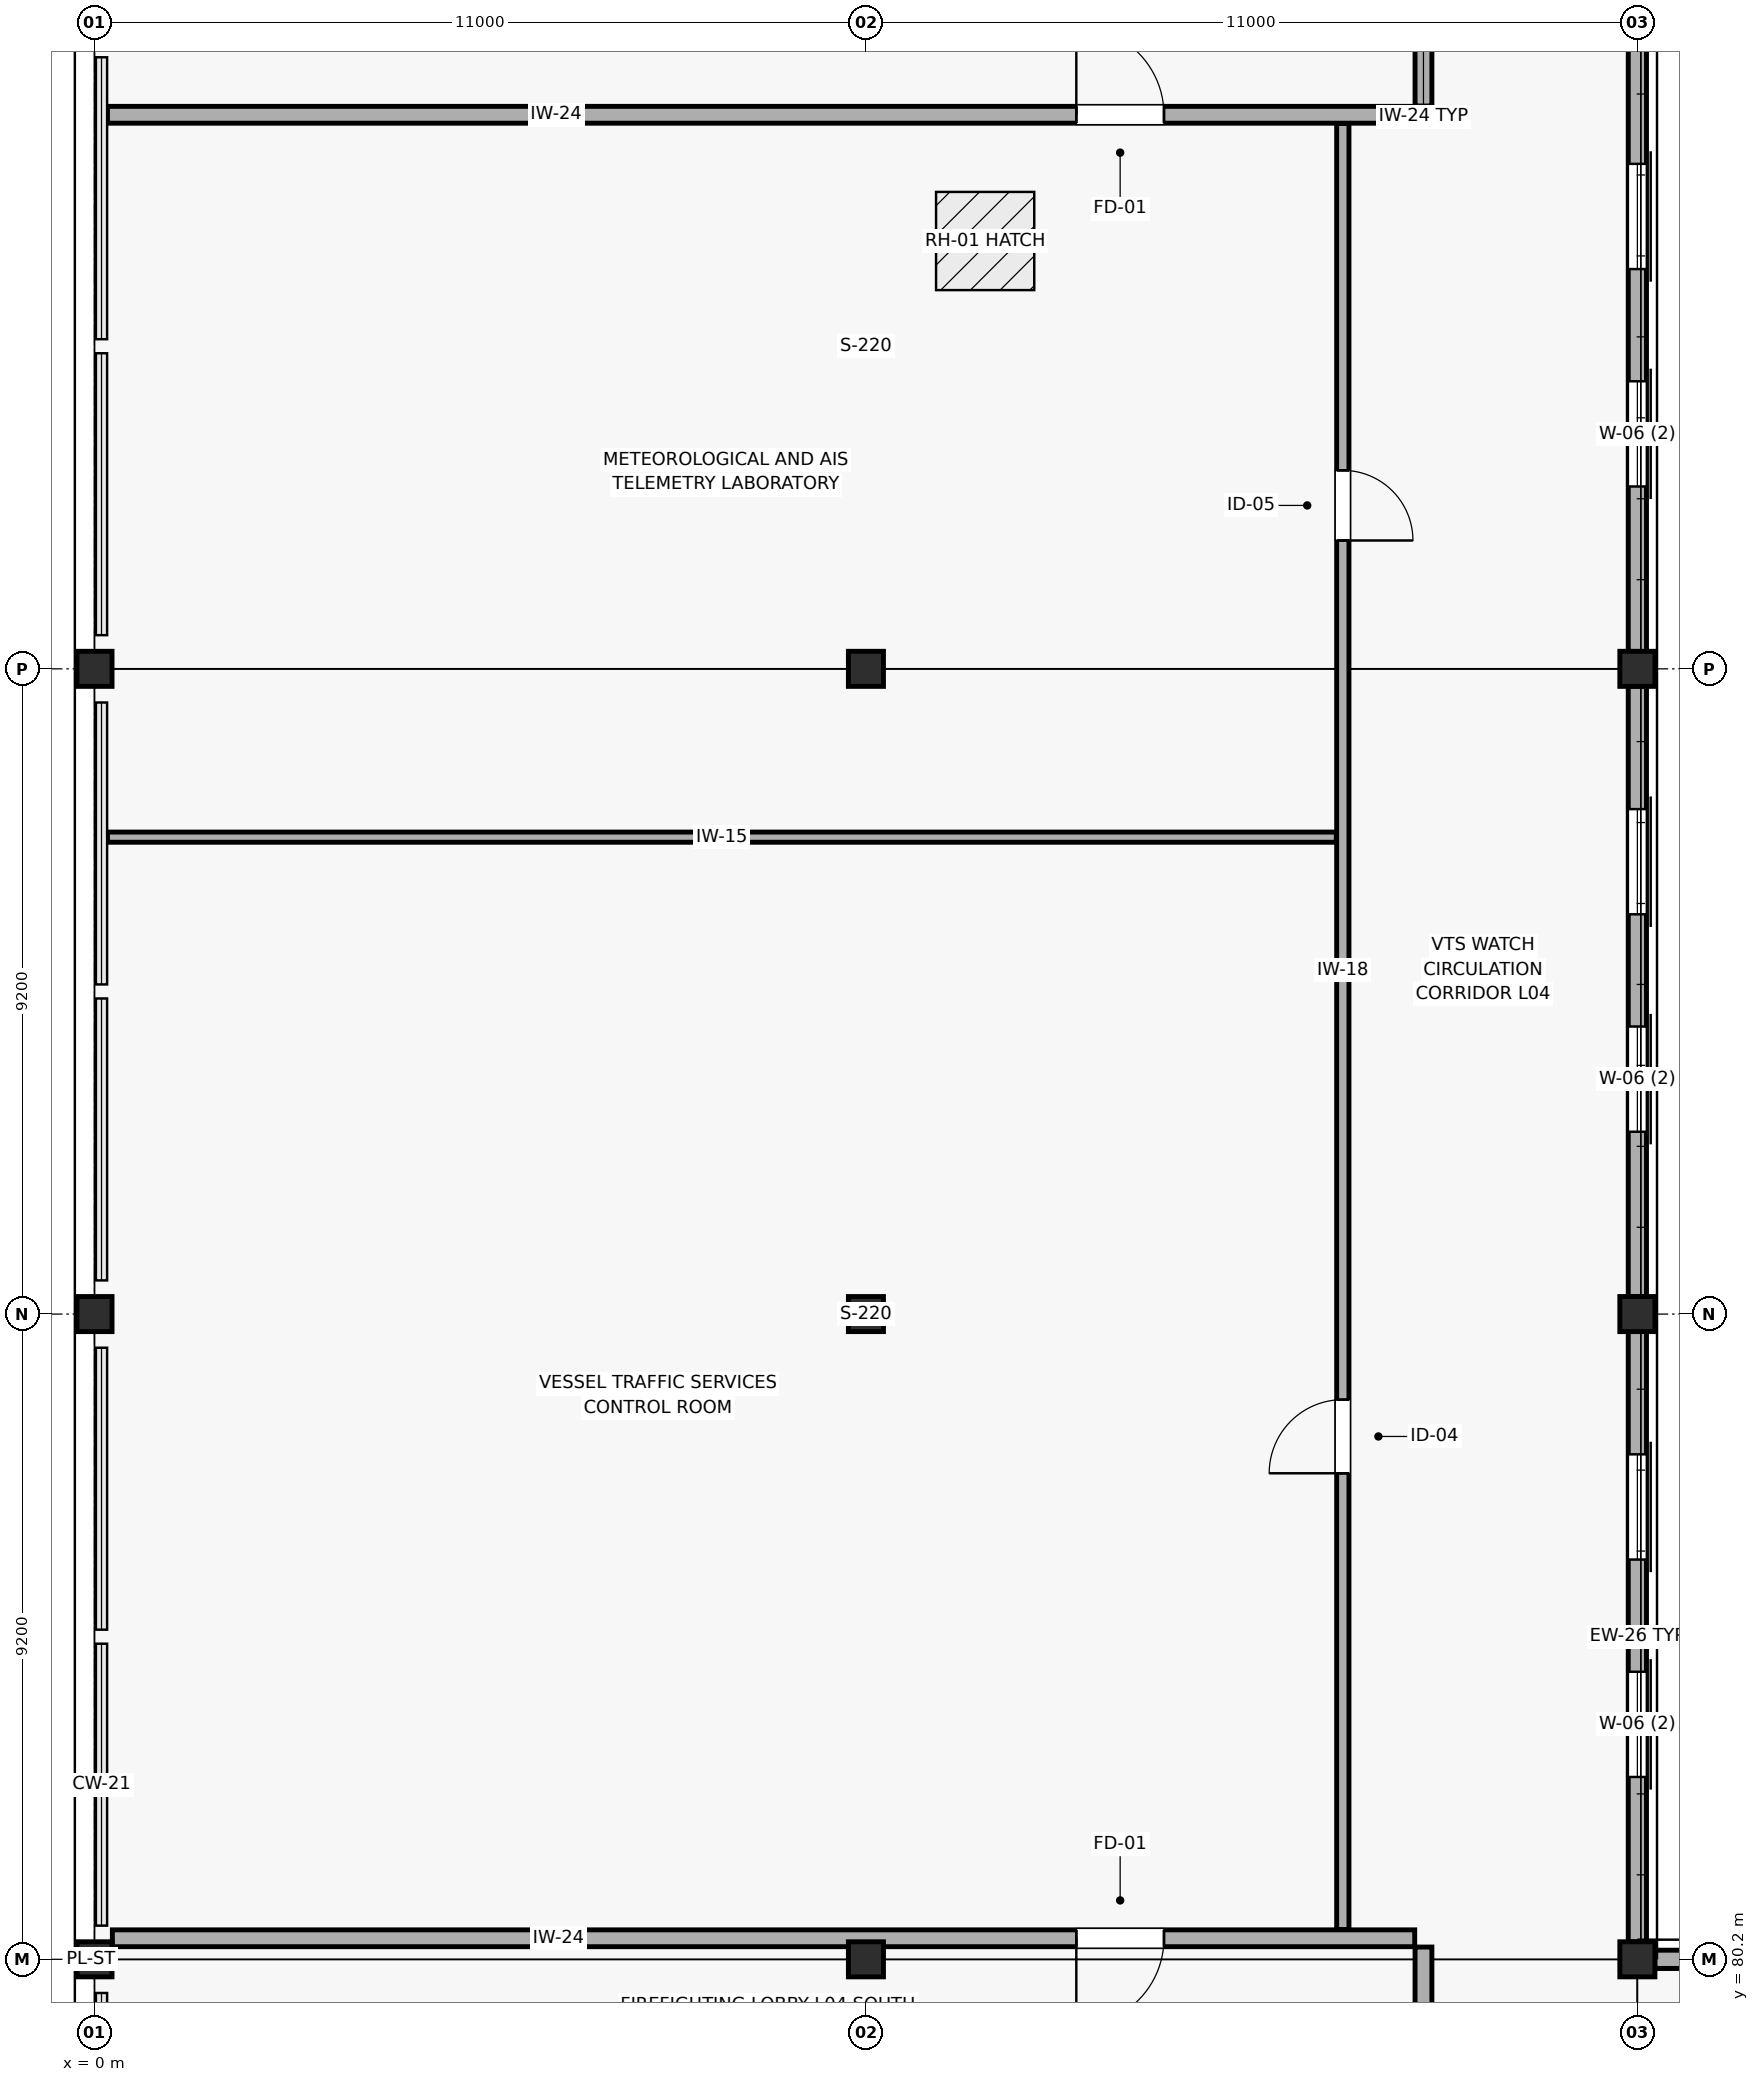
"""IFC4 building model, lengths in metres.
Left out: names, types, materials, properties, quantities, classifications, styles, units other than length and angle.
Written with IfcOpenShell. Run it as: python <this file> out.ifc"""

import sys

from ifc_helpers import new_model, si_unit, direction, frame, frame_2d, origin, origin_2d, place, context, subcontext, project, spatial, rectangle, extrude, element, fill, save


model = new_model("IFC4")
c1 = context("Model", 3, precision=1e-05, world=origin(), true_north=direction((0.0, 1.0)))
c2 = subcontext(c1, "Body", "Model", "MODEL_VIEW")
j1 = project(units=[si_unit("LENGTHUNIT", "METRE"), si_unit("PLANEANGLEUNIT", "RADIAN")], contexts=[c1])
p1 = place(None, origin())
s1 = spatial("IfcSite", under=j1, at=p1, CompositionType="ELEMENT")
p2 = place(p1, origin())
s2 = spatial("IfcBuilding", under=s1, at=p2, CompositionType="ELEMENT")
p3 = place(p2, frame((0.0, 0.0, 18.3)))
s3 = spatial("IfcBuildingStorey", under=s2, at=p3, CompositionType="ELEMENT", Elevation=18.3)
for number, where, z_axis, x_axis in (
    (1, (0.0, 80.2, 0.0), (0.0, 0.0, 1.0), (1.0, 0.0, 0.0)),
    (2, (0.0, 89.4, 0.0), (0.0, 0.0, 1.0), (1.0, 0.0, 0.0)),
    (3, (0.0, 98.6, 0.0), (0.0, 0.0, 1.0), (1.0, 0.0, 0.0)),
    (4, (11.0, 80.2, 0.0), (0.0, 0.0, 1.0), (1.0, 0.0, 0.0)),
    (5, (11.0, 89.4, 0.0), (0.0, 0.0, 1.0), (1.0, 0.0, 0.0)),
    (6, (11.0, 98.6, 0.0), (0.0, 0.0, 1.0), (1.0, 0.0, 0.0)),
    (7, (22.0, 80.2, 0.0), (0.0, 0.0, 1.0), (1.0, 0.0, 0.0)),
    (8, (22.0, 89.4, 0.0), (0.0, 0.0, 1.0), (1.0, 0.0, 0.0)),
    (9, (22.0, 98.6, 0.0), (0.0, 0.0, 1.0), (1.0, 0.0, 0.0)),
):
    element("IfcColumn", number, at=place(p3, frame(where, z_axis=z_axis, x_axis=x_axis)), inside=s3, PredefinedType="COLUMN", context=c2, shape_type="SweptSolid", body=[
        extrude(rectangle(XDim=0.5, YDim=0.5, at=origin_2d()), origin(), (0.0, 0.0, 1.0), 4.2),
    ])
p4 = place(p3, frame((43.752, 80.2, 0.0), z_axis=(0.0, 0.0, 1.0), x_axis=(-1.0, 0.0, 0.0)))
e10 = element("IfcWall", 10, at=p4, inside=s3, PredefinedType="SOLIDWALL", context=c2, shape_type="SweptSolid", body=[
    extrude(rectangle(XDim=21.504, YDim=0.26, at=frame_2d((10.752, 0.0))), origin(), (0.0, 0.0, 1.0), 3.447),
])
p5 = place(p4, frame((4.752, 0.0, 0.95)))
e11 = element("IfcOpeningElement", 11, at=p5, cuts=e10, PredefinedType="OPENING", context=c2, shape_type="SweptSolid", body=[
    extrude(rectangle(XDim=1.8, YDim=1.8, at=frame_2d((0.9, 0.9))), frame((0.0, 0.14, 0.0), z_axis=(0.0, -1.0, 0.0), x_axis=(1.0, 0.0, 0.0)), (0.0, 0.0, 1.0), 0.28),
])
p6 = place(p4, frame((13.252, 0.0, 0.95)))
e12 = element("IfcOpeningElement", 12, at=p6, cuts=e10, PredefinedType="OPENING", context=c2, shape_type="SweptSolid", body=[
    extrude(rectangle(XDim=1.8, YDim=1.8, at=frame_2d((0.9, 0.9))), frame((0.0, 0.14, 0.0), z_axis=(0.0, -1.0, 0.0), x_axis=(1.0, 0.0, 0.0)), (0.0, 0.0, 1.0), 0.28),
])
p7 = place(p3, frame((22.0, 80.448, 0.0), z_axis=(0.0, 0.0, 1.0), x_axis=(0.0, 1.0, 0.0)))
e13 = element("IfcWall", 13, at=p7, inside=s3, PredefinedType="SOLIDWALL", context=c2, shape_type="SweptSolid", body=[
    extrude(rectangle(XDim=8.704, YDim=0.26, at=frame_2d((4.352, 0.0))), origin(), (0.0, 0.0, 1.0), 3.449),
])
p8 = place(p7, frame((2.352, 0.0, 0.95)))
e14 = element("IfcOpeningElement", 14, at=p8, cuts=e13, PredefinedType="OPENING", context=c2, shape_type="SweptSolid", body=[
    extrude(rectangle(XDim=1.5, YDim=1.8, at=frame_2d((0.75, 0.9))), frame((0.0, 0.14, 0.0), z_axis=(0.0, -1.0, 0.0), x_axis=(1.0, 0.0, 0.0)), (0.0, 0.0, 1.0), 0.28),
])
p9 = place(p7, frame((5.452, 0.0, 0.95)))
e15 = element("IfcOpeningElement", 15, at=p9, cuts=e13, PredefinedType="OPENING", context=c2, shape_type="SweptSolid", body=[
    extrude(rectangle(XDim=1.5, YDim=1.8, at=frame_2d((0.75, 0.9))), frame((0.0, 0.14, 0.0), z_axis=(0.0, -1.0, 0.0), x_axis=(1.0, 0.0, 0.0)), (0.0, 0.0, 1.0), 0.28),
])
p10 = place(p3, frame((22.0, 89.648, 0.0), z_axis=(0.0, 0.0, 1.0), x_axis=(0.0, 1.0, 0.0)))
e16 = element("IfcWall", 16, at=p10, inside=s3, PredefinedType="SOLIDWALL", context=c2, shape_type="SweptSolid", body=[
    extrude(rectangle(XDim=8.704, YDim=0.26, at=frame_2d((4.352, 0.0))), origin(), (0.0, 0.0, 1.0), 3.449),
])
p11 = place(p10, frame((2.352, 0.0, 0.95)))
e17 = element("IfcOpeningElement", 17, at=p11, cuts=e16, PredefinedType="OPENING", context=c2, shape_type="SweptSolid", body=[
    extrude(rectangle(XDim=1.5, YDim=1.8, at=frame_2d((0.75, 0.9))), frame((0.0, 0.14, 0.0), z_axis=(0.0, -1.0, 0.0), x_axis=(1.0, 0.0, 0.0)), (0.0, 0.0, 1.0), 0.28),
])
p12 = place(p10, frame((5.452, 0.0, 0.95)))
e18 = element("IfcOpeningElement", 18, at=p12, cuts=e16, PredefinedType="OPENING", context=c2, shape_type="SweptSolid", body=[
    extrude(rectangle(XDim=1.5, YDim=1.8, at=frame_2d((0.75, 0.9))), frame((0.0, 0.14, 0.0), z_axis=(0.0, -1.0, 0.0), x_axis=(1.0, 0.0, 0.0)), (0.0, 0.0, 1.0), 0.28),
])
p13 = place(p3, frame((22.0, 98.848, 0.0), z_axis=(0.0, 0.0, 1.0), x_axis=(0.0, 1.0, 0.0)))
e19 = element("IfcWall", 19, at=p13, inside=s3, PredefinedType="SOLIDWALL", context=c2, shape_type="SweptSolid", body=[
    extrude(rectangle(XDim=8.704, YDim=0.26, at=frame_2d((4.352, 0.0))), origin(), (0.0, 0.0, 1.0), 3.449),
])
p14 = place(p13, frame((2.352, 0.0, 0.95)))
e20 = element("IfcOpeningElement", 20, at=p14, cuts=e19, PredefinedType="OPENING", context=c2, shape_type="SweptSolid", body=[
    extrude(rectangle(XDim=1.5, YDim=1.8, at=frame_2d((0.75, 0.9))), frame((0.0, 0.14, 0.0), z_axis=(0.0, -1.0, 0.0), x_axis=(1.0, 0.0, 0.0)), (0.0, 0.0, 1.0), 0.28),
])
p15 = place(p13, frame((5.452, 0.0, 0.95)))
e21 = element("IfcOpeningElement", 21, at=p15, cuts=e19, PredefinedType="OPENING", context=c2, shape_type="SweptSolid", body=[
    extrude(rectangle(XDim=1.5, YDim=1.8, at=frame_2d((0.75, 0.9))), frame((0.0, 0.14, 0.0), z_axis=(0.0, -1.0, 0.0), x_axis=(1.0, 0.0, 0.0)), (0.0, 0.0, 1.0), 0.28),
])
p16 = place(p3, frame((0.185, 106.5, 0.0), z_axis=(0.0, 0.0, 1.0), x_axis=(1.0, 0.0, 0.0)))
e22 = element("IfcWall", 22, at=p16, inside=s3, PredefinedType="PARTITIONING", context=c2, shape_type="SweptSolid", body=[
    extrude(rectangle(XDim=18.64, YDim=0.24, at=frame_2d((9.32, 0.0))), origin(), (0.0, 0.0, 1.0), 3.449),
])
p17 = place(p16, frame((13.815, 0.0, 0.0)))
e23 = element("IfcOpeningElement", 23, at=p17, cuts=e22, PredefinedType="OPENING", context=c2, shape_type="SweptSolid", body=[
    extrude(rectangle(XDim=1.25, YDim=2.2, at=frame_2d((0.625, 1.1))), frame((0.0, 0.13, 0.0), z_axis=(0.0, -1.0, 0.0), x_axis=(1.0, 0.0, 0.0)), (0.0, 0.0, 1.0), 0.26),
])
p18 = place(p3, frame((0.255, 80.5, 0.0), z_axis=(0.0, 0.0, 1.0), x_axis=(1.0, 0.0, 0.0)))
e24 = element("IfcWall", 24, at=p18, inside=s3, PredefinedType="PARTITIONING", context=c2, shape_type="SweptSolid", body=[
    extrude(rectangle(XDim=18.57, YDim=0.24, at=frame_2d((9.285, 0.0))), origin(), (0.0, 0.0, 1.0), 3.449),
])
p19 = place(p18, frame((13.745, 0.0, 0.0)))
e25 = element("IfcOpeningElement", 25, at=p19, cuts=e24, PredefinedType="OPENING", context=c2, shape_type="SweptSolid", body=[
    extrude(rectangle(XDim=1.25, YDim=2.2, at=frame_2d((0.625, 1.1))), frame((0.0, 0.13, 0.0), z_axis=(0.0, -1.0, 0.0), x_axis=(1.0, 0.0, 0.0)), (0.0, 0.0, 1.0), 0.26),
])
p20 = place(p3, frame((17.8, 80.625, 0.0), z_axis=(0.0, 0.0, 1.0), x_axis=(0.0, 1.0, 0.0)))
e26 = element("IfcWall", 26, at=p20, inside=s3, PredefinedType="PARTITIONING", context=c2, shape_type="SweptSolid", body=[
    extrude(rectangle(XDim=25.75, YDim=0.175, at=frame_2d((12.875, 0.0))), origin(), (0.0, 0.0, 1.0), 3.447),
])
p21 = place(p20, frame((6.505, 0.0, 0.0)))
e27 = element("IfcOpeningElement", 27, at=p21, cuts=e26, PredefinedType="OPENING", context=c2, shape_type="SweptSolid", body=[
    extrude(rectangle(XDim=1.05, YDim=2.2, at=frame_2d((0.525, 1.1))), frame((0.0, 0.097, 0.0), z_axis=(0.0, -1.0, 0.0), x_axis=(1.0, 0.0, 0.0)), (0.0, 0.0, 1.0), 0.195),
])
p22 = place(p20, frame((19.805, 0.0, 0.0)))
e28 = element("IfcOpeningElement", 28, at=p22, cuts=e26, PredefinedType="OPENING", context=c2, shape_type="SweptSolid", body=[
    extrude(rectangle(XDim=1.0, YDim=2.15, at=frame_2d((0.5, 1.075))), frame((0.0, 0.097, 0.0), z_axis=(0.0, -1.0, 0.0), x_axis=(1.0, 0.0, 0.0)), (0.0, 0.0, 1.0), 0.195),
])
p23 = place(p3, frame((0.185, 96.2, 0.0), z_axis=(0.0, 0.0, 1.0), x_axis=(1.0, 0.0, 0.0)))
e29 = element("IfcWall", 29, at=p23, inside=s3, PredefinedType="PARTITIONING", context=c2, shape_type="SweptSolid", body=[
    extrude(rectangle(XDim=17.522, YDim=0.145, at=frame_2d((8.761, 0.0))), origin(), (0.0, 0.0, 1.0), 3.449),
])
p24 = place(p3, frame((18.95, 106.625, 0.0), z_axis=(0.0, 0.0, 1.0), x_axis=(0.0, 1.0, 0.0)))
e30 = element("IfcWall", 30, at=p24, inside=s3, PredefinedType="PARTITIONING", context=c2, shape_type="SweptSolid", body=[
    extrude(rectangle(XDim=3.498, YDim=0.24, at=frame_2d((1.749, 0.0))), origin(), (0.0, 0.0, 1.0), 3.447),
])
p25 = place(p24, frame((1.055, 0.0, 0.0)))
e31 = element("IfcOpeningElement", 31, at=p25, cuts=e30, PredefinedType="OPENING", context=c2, shape_type="SweptSolid", body=[
    extrude(rectangle(XDim=1.25, YDim=2.2, at=frame_2d((0.625, 1.1))), frame((0.0, 0.13, 0.0), z_axis=(0.0, -1.0, 0.0), x_axis=(1.0, 0.0, 0.0)), (0.0, 0.0, 1.0), 0.26),
])
p26 = place(p3, frame((18.95, 76.85, 0.0), z_axis=(0.0, 0.0, 1.0), x_axis=(0.0, 1.0, 0.0)))
e32 = element("IfcWall", 32, at=p26, inside=s3, PredefinedType="PARTITIONING", context=c2, shape_type="SweptSolid", body=[
    extrude(rectangle(XDim=3.525, YDim=0.24, at=frame_2d((1.762, 0.0))), origin(), (0.0, 0.0, 1.0), 3.447),
])
p27 = place(p26, frame((1.05, 0.0, 0.0)))
e33 = element("IfcOpeningElement", 33, at=p27, cuts=e32, PredefinedType="OPENING", context=c2, shape_type="SweptSolid", body=[
    extrude(rectangle(XDim=1.25, YDim=2.2, at=frame_2d((0.625, 1.1))), frame((0.0, 0.13, 0.0), z_axis=(0.0, -1.0, 0.0), x_axis=(1.0, 0.0, 0.0)), (0.0, 0.0, 1.0), 0.26),
])
p28 = place(p8, origin())
e34 = element("IfcWindow", 34, at=p28, inside=s3, PartitioningType="SINGLE_PANEL", PredefinedType="WINDOW", context=c2, shape_type="SweptSolid", body=[
    extrude(rectangle(XDim=1.5, YDim=1.8, at=frame_2d((0.75, 0.9))), frame((0.0, 0.03, 0.0), z_axis=(0.0, -1.0, 0.0), x_axis=(1.0, 0.0, 0.0)), (0.0, 0.0, 1.0), 0.06),
])
fill(e14, e34)
p29 = place(p9, origin())
e35 = element("IfcWindow", 35, at=p29, inside=s3, PartitioningType="SINGLE_PANEL", PredefinedType="WINDOW", context=c2, shape_type="SweptSolid", body=[
    extrude(rectangle(XDim=1.5, YDim=1.8, at=frame_2d((0.75, 0.9))), frame((0.0, 0.03, 0.0), z_axis=(0.0, -1.0, 0.0), x_axis=(1.0, 0.0, 0.0)), (0.0, 0.0, 1.0), 0.06),
])
fill(e15, e35)
p30 = place(p11, origin())
e36 = element("IfcWindow", 36, at=p30, inside=s3, PartitioningType="SINGLE_PANEL", PredefinedType="WINDOW", context=c2, shape_type="SweptSolid", body=[
    extrude(rectangle(XDim=1.5, YDim=1.8, at=frame_2d((0.75, 0.9))), frame((0.0, 0.03, 0.0), z_axis=(0.0, -1.0, 0.0), x_axis=(1.0, 0.0, 0.0)), (0.0, 0.0, 1.0), 0.06),
])
fill(e17, e36)
p31 = place(p12, origin())
e37 = element("IfcWindow", 37, at=p31, inside=s3, PartitioningType="SINGLE_PANEL", PredefinedType="WINDOW", context=c2, shape_type="SweptSolid", body=[
    extrude(rectangle(XDim=1.5, YDim=1.8, at=frame_2d((0.75, 0.9))), frame((0.0, 0.03, 0.0), z_axis=(0.0, -1.0, 0.0), x_axis=(1.0, 0.0, 0.0)), (0.0, 0.0, 1.0), 0.06),
])
fill(e18, e37)
p32 = place(p14, origin())
e38 = element("IfcWindow", 38, at=p32, inside=s3, PartitioningType="SINGLE_PANEL", PredefinedType="WINDOW", context=c2, shape_type="SweptSolid", body=[
    extrude(rectangle(XDim=1.5, YDim=1.8, at=frame_2d((0.75, 0.9))), frame((0.0, 0.03, 0.0), z_axis=(0.0, -1.0, 0.0), x_axis=(1.0, 0.0, 0.0)), (0.0, 0.0, 1.0), 0.06),
])
fill(e20, e38)
p33 = place(p15, origin())
e39 = element("IfcWindow", 39, at=p33, inside=s3, PartitioningType="SINGLE_PANEL", PredefinedType="WINDOW", context=c2, shape_type="SweptSolid", body=[
    extrude(rectangle(XDim=1.5, YDim=1.8, at=frame_2d((0.75, 0.9))), frame((0.0, 0.03, 0.0), z_axis=(0.0, -1.0, 0.0), x_axis=(1.0, 0.0, 0.0)), (0.0, 0.0, 1.0), 0.06),
])
fill(e21, e39)
p34 = place(p17, origin())
e40 = element("IfcDoor", 40, at=p34, inside=s3, OperationType="SINGLE_SWING_LEFT", PredefinedType="DOOR", context=c2, shape_type="SweptSolid", body=[
    extrude(rectangle(XDim=1.25, YDim=2.2, at=frame_2d((0.625, 1.1))), frame((0.0, 0.025, 0.0), z_axis=(0.0, -1.0, 0.0), x_axis=(1.0, 0.0, 0.0)), (0.0, 0.0, 1.0), 0.05),
])
fill(e23, e40)
p35 = place(p19, frame((1.25, 0.0, 0.0), z_axis=(0.0, 0.0, 1.0), x_axis=(-1.0, 0.0, 0.0)))
e41 = element("IfcDoor", 41, at=p35, inside=s3, OperationType="SINGLE_SWING_RIGHT", PredefinedType="DOOR", context=c2, shape_type="SweptSolid", body=[
    extrude(rectangle(XDim=1.25, YDim=2.2, at=frame_2d((0.625, 1.1))), frame((0.0, 0.025, 0.0), z_axis=(0.0, -1.0, 0.0), x_axis=(1.0, 0.0, 0.0)), (0.0, 0.0, 1.0), 0.05),
])
fill(e25, e41)
p36 = place(p21, origin())
e42 = element("IfcDoor", 42, at=p36, inside=s3, OperationType="SINGLE_SWING_LEFT", PredefinedType="DOOR", context=c2, shape_type="SweptSolid", body=[
    extrude(rectangle(XDim=1.05, YDim=2.2, at=frame_2d((0.525, 1.1))), frame((0.0, 0.025, 0.0), z_axis=(0.0, -1.0, 0.0), x_axis=(1.0, 0.0, 0.0)), (0.0, 0.0, 1.0), 0.05),
])
fill(e27, e42)
p37 = place(p22, frame((1.0, 0.0, 0.0), z_axis=(0.0, 0.0, 1.0), x_axis=(-1.0, 0.0, 0.0)))
e43 = element("IfcDoor", 43, at=p37, inside=s3, OperationType="SINGLE_SWING_RIGHT", PredefinedType="DOOR", context=c2, shape_type="SweptSolid", body=[
    extrude(rectangle(XDim=1.0, YDim=2.15, at=frame_2d((0.5, 1.075))), frame((0.0, 0.025, 0.0), z_axis=(0.0, -1.0, 0.0), x_axis=(1.0, 0.0, 0.0)), (0.0, 0.0, 1.0), 0.05),
])
fill(e28, e43)
p38 = place(p2, frame((0.0, 0.0, 22.5)))
p39 = place(p38, frame((0.0, 0.0, -0.21)))
p40 = place(p39, frame((12.7, 104.7, 0.15)))
e44 = element("IfcDoor", 44, at=p40, inside=s3, OperationType="SINGLE_SWING_LEFT", PredefinedType="TRAPDOOR", context=c2, shape_type="SweptSolid", body=[
    extrude(rectangle(XDim=1.4, YDim=1.4, at=origin_2d()), origin(), (0.0, 0.0, 1.0), 0.06),
])
save(model, sys.argv[1])
